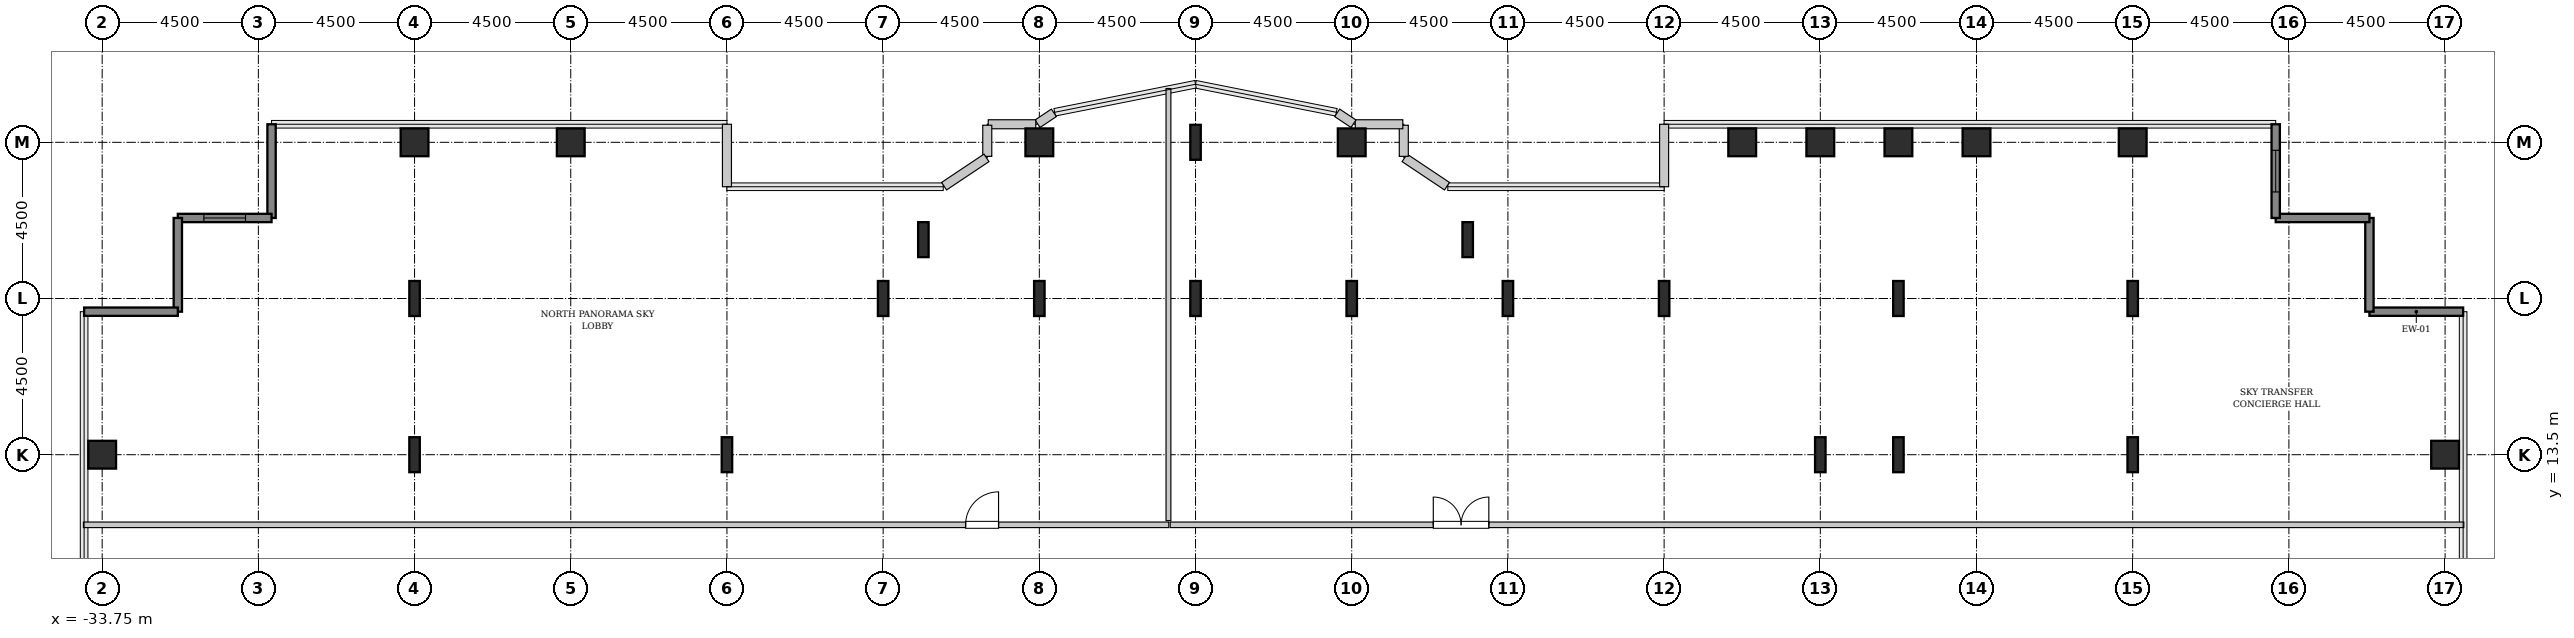
"""IFC4 building model, lengths in metres.
Left out: names, types, materials, properties, quantities, classifications, styles, units other than length and angle.
Written with IfcOpenShell. Run it as: python <this file> out.ifc"""

import sys

from ifc_helpers import new_model, si_unit, direction, frame, frame_2d, origin, origin_2d, place, context, subcontext, project, spatial, rectangle, hollow_rectangle, i_section, extrude, source, transform, mapped, element, fill, save


model = new_model("IFC4")
c1 = context("Model", 3, precision=1e-05, world=origin(), true_north=direction((0.0, 1.0)))
c2 = subcontext(c1, "Body", "Model", "MODEL_VIEW")
j1 = project(units=[si_unit("LENGTHUNIT", "METRE"), si_unit("PLANEANGLEUNIT", "RADIAN")], contexts=[c1])
p1 = place(None, origin())
s1 = spatial("IfcSite", under=j1, at=p1, CompositionType="ELEMENT")
p2 = place(p1, origin())
s2 = spatial("IfcBuilding", under=s1, at=p2, CompositionType="ELEMENT")
p3 = place(p2, frame((0.0, 0.0, 144.0)))
s3 = spatial("IfcBuildingStorey", under=s2, at=p3, CompositionType="ELEMENT", Elevation=144.0)
m1 = source(origin(), c2, "Body", "SweptSolid", [
    extrude(hollow_rectangle(XDim=0.8, YDim=0.8, WallThickness=0.04, InnerFilletRadius=0.04, OuterFilletRadius=0.08, at=origin_2d()), origin(), (0.0, 0.0, 1.0), 4.8),
])
p4 = place(p3, frame((-33.75, 13.5, 0.0), z_axis=(0.0, 0.0, 1.0), x_axis=(1.0, 0.0, 0.0)))
e1 = element("IfcColumn", 1, at=p4, inside=s3, PredefinedType="COLUMN", context=c2, shape_type="MappedRepresentation", body=[
    mapped(m1, transform((0.0, 0.0, 0.0), x_axis=(1.0, 0.0, 0.0), y_axis=(0.0, 1.0, 0.0), z_axis=(0.0, 0.0, 1.0), scale=1.0)),
])
m2 = source(origin(), c2, "Body", "SweptSolid", [
    extrude(i_section(OverallWidth=0.302, OverallDepth=1.008, WebThickness=0.021, FlangeThickness=0.04, FilletRadius=0.03, at=origin_2d()), origin(), (0.0, 0.0, 1.0), 4.8),
])
for number, where, z_axis, x_axis in (
    (2, (-24.75, 13.5, 0.0), (0.0, 0.0, 1.0), (1.0, 0.0, 0.0)),
    (3, (-24.75, 18.0, 0.0), (0.0, 0.0, 1.0), (1.0, 0.0, 0.0)),
):
    element("IfcColumn", number, at=place(p3, frame(where, z_axis=z_axis, x_axis=x_axis)), inside=s3, PredefinedType="COLUMN", context=c2, shape_type="MappedRepresentation", body=[
        mapped(m2, transform((0.0, 0.0, 0.0), x_axis=(1.0, 0.0, 0.0), y_axis=(0.0, 1.0, 0.0), z_axis=(0.0, 0.0, 1.0), scale=1.0)),
    ])
for number, where, z_axis, x_axis in (
    (4, (-24.75, 22.5, 0.0), (0.0, 0.0, 1.0), (1.0, 0.0, 0.0)),
    (5, (-20.25, 22.5, 0.0), (0.0, 0.0, 1.0), (1.0, 0.0, 0.0)),
):
    element("IfcColumn", number, at=place(p3, frame(where, z_axis=z_axis, x_axis=x_axis)), inside=s3, PredefinedType="COLUMN", context=c2, shape_type="MappedRepresentation", body=[
        mapped(m1, transform((0.0, 0.0, 0.0), x_axis=(1.0, 0.0, 0.0), y_axis=(0.0, 1.0, 0.0), z_axis=(0.0, 0.0, 1.0), scale=1.0)),
    ])
for number, where, z_axis, x_axis in (
    (6, (-15.75, 13.5, 0.0), (0.0, 0.0, 1.0), (1.0, 0.0, 0.0)),
    (7, (-11.25, 18.0, 0.0), (0.0, 0.0, 1.0), (1.0, 0.0, 0.0)),
    (8, (-10.091, 19.696, 0.0), (0.0, 0.0, 1.0), (1.0, 0.0, 0.0)),
    (9, (-6.75, 18.0, 0.0), (0.0, 0.0, 1.0), (1.0, 0.0, 0.0)),
):
    element("IfcColumn", number, at=place(p3, frame(where, z_axis=z_axis, x_axis=x_axis)), inside=s3, PredefinedType="COLUMN", context=c2, shape_type="MappedRepresentation", body=[
        mapped(m2, transform((0.0, 0.0, 0.0), x_axis=(1.0, 0.0, 0.0), y_axis=(0.0, 1.0, 0.0), z_axis=(0.0, 0.0, 1.0), scale=1.0)),
    ])
p5 = place(p3, frame((-6.75, 22.5, 0.0), z_axis=(0.0, 0.0, 1.0), x_axis=(1.0, 0.0, 0.0)))
e10 = element("IfcColumn", 10, at=p5, inside=s3, PredefinedType="COLUMN", context=c2, shape_type="MappedRepresentation", body=[
    mapped(m1, transform((0.0, 0.0, 0.0), x_axis=(1.0, 0.0, 0.0), y_axis=(0.0, 1.0, 0.0), z_axis=(0.0, 0.0, 1.0), scale=1.0)),
])
for number, where, z_axis, x_axis in (
    (11, (-2.25, 18.0, 0.0), (0.0, 0.0, 1.0), (1.0, 0.0, 0.0)),
    (12, (-2.25, 22.5, 0.0), (0.0, 0.0, 1.0), (1.0, 0.0, 0.0)),
    (13, (2.25, 18.0, 0.0), (0.0, 0.0, 1.0), (1.0, 0.0, 0.0)),
):
    element("IfcColumn", number, at=place(p3, frame(where, z_axis=z_axis, x_axis=x_axis)), inside=s3, PredefinedType="COLUMN", context=c2, shape_type="MappedRepresentation", body=[
        mapped(m2, transform((0.0, 0.0, 0.0), x_axis=(1.0, 0.0, 0.0), y_axis=(0.0, 1.0, 0.0), z_axis=(0.0, 0.0, 1.0), scale=1.0)),
    ])
p6 = place(p3, frame((2.25, 22.5, 0.0), z_axis=(0.0, 0.0, 1.0), x_axis=(1.0, 0.0, 0.0)))
e14 = element("IfcColumn", 14, at=p6, inside=s3, PredefinedType="COLUMN", context=c2, shape_type="MappedRepresentation", body=[
    mapped(m1, transform((0.0, 0.0, 0.0), x_axis=(1.0, 0.0, 0.0), y_axis=(0.0, 1.0, 0.0), z_axis=(0.0, 0.0, 1.0), scale=1.0)),
])
for number, where, z_axis, x_axis in (
    (15, (5.591, 19.696, 0.0), (0.0, 0.0, 1.0), (1.0, 0.0, 0.0)),
    (16, (6.75, 18.0, 0.0), (0.0, 0.0, 1.0), (1.0, 0.0, 0.0)),
    (17, (11.25, 18.0, 0.0), (0.0, 0.0, 1.0), (1.0, 0.0, 0.0)),
):
    element("IfcColumn", number, at=place(p3, frame(where, z_axis=z_axis, x_axis=x_axis)), inside=s3, PredefinedType="COLUMN", context=c2, shape_type="MappedRepresentation", body=[
        mapped(m2, transform((0.0, 0.0, 0.0), x_axis=(1.0, 0.0, 0.0), y_axis=(0.0, 1.0, 0.0), z_axis=(0.0, 0.0, 1.0), scale=1.0)),
    ])
p7 = place(p3, frame((13.5, 22.5, 0.0), z_axis=(0.0, 0.0, 1.0), x_axis=(1.0, 0.0, 0.0)))
e18 = element("IfcColumn", 18, at=p7, inside=s3, PredefinedType="COLUMN", context=c2, shape_type="MappedRepresentation", body=[
    mapped(m1, transform((0.0, 0.0, 0.0), x_axis=(1.0, 0.0, 0.0), y_axis=(0.0, 1.0, 0.0), z_axis=(0.0, 0.0, 1.0), scale=1.0)),
])
p8 = place(p3, frame((15.75, 13.5, 0.0), z_axis=(0.0, 0.0, 1.0), x_axis=(1.0, 0.0, 0.0)))
e19 = element("IfcColumn", 19, at=p8, inside=s3, PredefinedType="COLUMN", context=c2, shape_type="MappedRepresentation", body=[
    mapped(m2, transform((0.0, 0.0, 0.0), x_axis=(1.0, 0.0, 0.0), y_axis=(0.0, 1.0, 0.0), z_axis=(0.0, 0.0, 1.0), scale=1.0)),
])
p9 = place(p3, frame((15.75, 22.5, 0.0), z_axis=(0.0, 0.0, 1.0), x_axis=(1.0, 0.0, 0.0)))
e20 = element("IfcColumn", 20, at=p9, inside=s3, PredefinedType="COLUMN", context=c2, shape_type="MappedRepresentation", body=[
    mapped(m1, transform((0.0, 0.0, 0.0), x_axis=(1.0, 0.0, 0.0), y_axis=(0.0, 1.0, 0.0), z_axis=(0.0, 0.0, 1.0), scale=1.0)),
])
for number, where, z_axis, x_axis in (
    (21, (18.0, 13.5, 0.0), (0.0, 0.0, 1.0), (1.0, 0.0, 0.0)),
    (22, (18.0, 18.0, 0.0), (0.0, 0.0, 1.0), (1.0, 0.0, 0.0)),
):
    element("IfcColumn", number, at=place(p3, frame(where, z_axis=z_axis, x_axis=x_axis)), inside=s3, PredefinedType="COLUMN", context=c2, shape_type="MappedRepresentation", body=[
        mapped(m2, transform((0.0, 0.0, 0.0), x_axis=(1.0, 0.0, 0.0), y_axis=(0.0, 1.0, 0.0), z_axis=(0.0, 0.0, 1.0), scale=1.0)),
    ])
for number, where, z_axis, x_axis in (
    (23, (18.0, 22.5, 0.0), (0.0, 0.0, 1.0), (1.0, 0.0, 0.0)),
    (24, (20.25, 22.5, 0.0), (0.0, 0.0, 1.0), (1.0, 0.0, 0.0)),
):
    element("IfcColumn", number, at=place(p3, frame(where, z_axis=z_axis, x_axis=x_axis)), inside=s3, PredefinedType="COLUMN", context=c2, shape_type="MappedRepresentation", body=[
        mapped(m1, transform((0.0, 0.0, 0.0), x_axis=(1.0, 0.0, 0.0), y_axis=(0.0, 1.0, 0.0), z_axis=(0.0, 0.0, 1.0), scale=1.0)),
    ])
for number, where, z_axis, x_axis in (
    (25, (24.75, 13.5, 0.0), (0.0, 0.0, 1.0), (1.0, 0.0, 0.0)),
    (26, (24.75, 18.0, 0.0), (0.0, 0.0, 1.0), (1.0, 0.0, 0.0)),
):
    element("IfcColumn", number, at=place(p3, frame(where, z_axis=z_axis, x_axis=x_axis)), inside=s3, PredefinedType="COLUMN", context=c2, shape_type="MappedRepresentation", body=[
        mapped(m2, transform((0.0, 0.0, 0.0), x_axis=(1.0, 0.0, 0.0), y_axis=(0.0, 1.0, 0.0), z_axis=(0.0, 0.0, 1.0), scale=1.0)),
    ])
for number, where, z_axis, x_axis in (
    (27, (24.75, 22.5, 0.0), (0.0, 0.0, 1.0), (1.0, 0.0, 0.0)),
    (28, (33.75, 13.5, 0.0), (0.0, 0.0, 1.0), (1.0, 0.0, 0.0)),
):
    element("IfcColumn", number, at=place(p3, frame(where, z_axis=z_axis, x_axis=x_axis)), inside=s3, PredefinedType="COLUMN", context=c2, shape_type="MappedRepresentation", body=[
        mapped(m1, transform((0.0, 0.0, 0.0), x_axis=(1.0, 0.0, 0.0), y_axis=(0.0, 1.0, 0.0), z_axis=(0.0, 0.0, 1.0), scale=1.0)),
    ])
m3 = source(origin(), c2, "Body", "SweptSolid", [
    extrude(rectangle(XDim=2.7, YDim=0.24, at=frame_2d((1.35, 0.0))), origin(), (0.0, 0.0, 1.0), 4.55),
])
for number, where, z_axis, x_axis in (
    (29, (34.27, 17.62, 0.0), (0.0, 0.0, 1.0), (-1.0, 0.0, 0.0)),
    (30, (31.57, 17.62, 0.0), (0.0, 0.0, 1.0), (0.0, 1.0, 0.0)),
    (31, (31.57, 20.32, 0.0), (0.0, 0.0, 1.0), (-1.0, 0.0, 0.0)),
):
    element("IfcWall", number, at=place(p3, frame(where, z_axis=z_axis, x_axis=x_axis)), inside=s3, PredefinedType="SHEAR", context=c2, shape_type="MappedRepresentation", body=[
        mapped(m3, transform((0.0, 0.0, 0.0), x_axis=(1.0, 0.0, 0.0), y_axis=(0.0, 1.0, 0.0), z_axis=(0.0, 0.0, 1.0), scale=1.0)),
    ])
p10 = place(p3, frame((28.87, 20.32, 0.0), z_axis=(0.0, 0.0, 1.0), x_axis=(0.0, 1.0, 0.0)))
e32 = element("IfcWall", 32, at=p10, inside=s3, PredefinedType="SHEAR", context=c2, shape_type="MappedRepresentation", body=[
    mapped(m3, transform((0.0, 0.0, 0.0), x_axis=(1.0, 0.0, 0.0), y_axis=(0.0, 1.0, 0.0), z_axis=(0.0, 0.0, 1.0), scale=1.0)),
])
p11 = place(p10, frame((0.75, 0.0, 0.85)))
e33 = element("IfcOpeningElement", 33, at=p11, cuts=e32, PredefinedType="OPENING", context=c2, shape_type="SweptSolid", body=[
    extrude(rectangle(XDim=1.2, YDim=1.8, at=frame_2d((0.6, 0.9))), frame((0.0, 0.13, 0.0), z_axis=(0.0, -1.0, 0.0), x_axis=(1.0, 0.0, 0.0)), (0.0, 0.0, 1.0), 0.26),
])
m4 = source(origin(), c2, "Body", "SweptSolid", [
    extrude(rectangle(XDim=1.8, YDim=0.26, at=frame_2d((0.9, 0.0))), origin(), (0.0, 0.0, 1.0), 4.55),
])
p12 = place(p3, frame((11.25, 23.02, 0.0), z_axis=(0.0, 0.0, 1.0), x_axis=(0.0, -1.0, 0.0)))
e34 = element("IfcWall", 34, at=p12, inside=s3, PredefinedType="SOLIDWALL", context=c2, shape_type="MappedRepresentation", body=[
    mapped(m4, transform((0.0, 0.0, 0.0), x_axis=(1.0, 0.0, 0.0), y_axis=(0.0, 1.0, 0.0), z_axis=(0.0, 0.0, 1.0), scale=1.0)),
])
m5 = source(origin(), c2, "Body", "SweptSolid", [
    extrude(rectangle(XDim=1.469, YDim=0.26, at=frame_2d((0.734, 0.0))), origin(), (0.0, 0.0, 1.0), 4.55),
])
p13 = place(p3, frame((4.995, 21.236, 0.0), z_axis=(0.0, 0.0, 1.0), x_axis=(-0.831461760506, 0.555581983884, 0.0)))
e35 = element("IfcWall", 35, at=p13, inside=s3, PredefinedType="SOLIDWALL", context=c2, shape_type="MappedRepresentation", body=[
    mapped(m5, transform((0.0, 0.0, 0.0), x_axis=(1.0, 0.0, 0.0), y_axis=(0.0, 1.0, 0.0), z_axis=(0.0, 0.0, 1.0), scale=1.0)),
])
m6 = source(origin(), c2, "Body", "SweptSolid", [
    extrude(rectangle(XDim=0.897, YDim=0.26, at=frame_2d((0.448, 0.0))), origin(), (0.0, 0.0, 1.0), 4.55),
])
p14 = place(p3, frame((3.75, 22.095, 0.0), z_axis=(0.0, 0.0, 1.0), x_axis=(0.0, 1.0, 0.0)))
e36 = element("IfcWall", 36, at=p14, inside=s3, PredefinedType="SOLIDWALL", context=c2, shape_type="MappedRepresentation", body=[
    mapped(m6, transform((0.0, 0.0, 0.0), x_axis=(1.0, 0.0, 0.0), y_axis=(0.0, 1.0, 0.0), z_axis=(0.0, 0.0, 1.0), scale=1.0)),
])
m7 = source(origin(), c2, "Body", "SweptSolid", [
    extrude(rectangle(XDim=1.37, YDim=0.26, at=frame_2d((0.685, 0.0))), origin(), (0.0, 0.0, 1.0), 4.55),
])
p15 = place(p3, frame((3.722, 23.02, 0.0), z_axis=(0.0, 0.0, 1.0), x_axis=(-1.0, 0.0, 0.0)))
e37 = element("IfcWall", 37, at=p15, inside=s3, PredefinedType="SOLIDWALL", context=c2, shape_type="MappedRepresentation", body=[
    mapped(m7, transform((0.0, 0.0, 0.0), x_axis=(1.0, 0.0, 0.0), y_axis=(0.0, 1.0, 0.0), z_axis=(0.0, 0.0, 1.0), scale=1.0)),
])
m8 = source(origin(), c2, "Body", "SweptSolid", [
    extrude(rectangle(XDim=0.565, YDim=0.26, at=frame_2d((0.283, 0.0))), origin(), (0.0, 0.0, 1.0), 4.55),
])
for number, where, z_axis, x_axis in (
    (38, (2.301, 23.036, 0.0), (0.0, 0.0, 1.0), (-0.832, 0.555, 0.0)),
    (39, (-6.331, 23.35, 0.0), (0.0, 0.0, 1.0), (-0.832, -0.555, 0.0)),
):
    element("IfcWall", number, at=place(p3, frame(where, z_axis=z_axis, x_axis=x_axis)), inside=s3, PredefinedType="SOLIDWALL", context=c2, shape_type="MappedRepresentation", body=[
        mapped(m8, transform((0.0, 0.0, 0.0), x_axis=(1.0, 0.0, 0.0), y_axis=(0.0, 1.0, 0.0), z_axis=(0.0, 0.0, 1.0), scale=1.0)),
    ])
p16 = place(p3, frame((-6.852, 23.02, 0.0), z_axis=(0.0, 0.0, 1.0), x_axis=(-1.0, 0.0, 0.0)))
e40 = element("IfcWall", 40, at=p16, inside=s3, PredefinedType="SOLIDWALL", context=c2, shape_type="MappedRepresentation", body=[
    mapped(m7, transform((0.0, 0.0, 0.0), x_axis=(1.0, 0.0, 0.0), y_axis=(0.0, 1.0, 0.0), z_axis=(0.0, 0.0, 1.0), scale=1.0)),
])
p17 = place(p3, frame((-8.25, 22.992, 0.0), z_axis=(0.0, 0.0, 1.0), x_axis=(0.0, -1.0, 0.0)))
e41 = element("IfcWall", 41, at=p17, inside=s3, PredefinedType="SOLIDWALL", context=c2, shape_type="MappedRepresentation", body=[
    mapped(m6, transform((0.0, 0.0, 0.0), x_axis=(1.0, 0.0, 0.0), y_axis=(0.0, 1.0, 0.0), z_axis=(0.0, 0.0, 1.0), scale=1.0)),
])
p18 = place(p3, frame((-8.273, 22.052, 0.0), z_axis=(0.0, 0.0, 1.0), x_axis=(-0.831461760506, -0.555581983884, 0.0)))
e42 = element("IfcWall", 42, at=p18, inside=s3, PredefinedType="SOLIDWALL", context=c2, shape_type="MappedRepresentation", body=[
    mapped(m5, transform((0.0, 0.0, 0.0), x_axis=(1.0, 0.0, 0.0), y_axis=(0.0, 1.0, 0.0), z_axis=(0.0, 0.0, 1.0), scale=1.0)),
])
p19 = place(p3, frame((-15.75, 21.22, 0.0), z_axis=(0.0, 0.0, 1.0), x_axis=(0.0, 1.0, 0.0)))
e43 = element("IfcWall", 43, at=p19, inside=s3, PredefinedType="SOLIDWALL", context=c2, shape_type="MappedRepresentation", body=[
    mapped(m4, transform((0.0, 0.0, 0.0), x_axis=(1.0, 0.0, 0.0), y_axis=(0.0, 1.0, 0.0), z_axis=(0.0, 0.0, 1.0), scale=1.0)),
])
p20 = place(p3, frame((-28.87, 23.02, 0.0), z_axis=(0.0, 0.0, 1.0), x_axis=(0.0, -1.0, 0.0)))
e44 = element("IfcWall", 44, at=p20, inside=s3, PredefinedType="SHEAR", context=c2, shape_type="MappedRepresentation", body=[
    mapped(m3, transform((0.0, 0.0, 0.0), x_axis=(1.0, 0.0, 0.0), y_axis=(0.0, 1.0, 0.0), z_axis=(0.0, 0.0, 1.0), scale=1.0)),
])
p21 = place(p3, frame((-28.87, 20.32, 0.0), z_axis=(0.0, 0.0, 1.0), x_axis=(-1.0, 0.0, 0.0)))
e45 = element("IfcWall", 45, at=p21, inside=s3, PredefinedType="SHEAR", context=c2, shape_type="MappedRepresentation", body=[
    mapped(m3, transform((0.0, 0.0, 0.0), x_axis=(1.0, 0.0, 0.0), y_axis=(0.0, 1.0, 0.0), z_axis=(0.0, 0.0, 1.0), scale=1.0)),
])
p22 = place(p21, frame((0.75, 0.0, 0.85)))
e46 = element("IfcOpeningElement", 46, at=p22, cuts=e45, PredefinedType="OPENING", context=c2, shape_type="SweptSolid", body=[
    extrude(rectangle(XDim=1.2, YDim=1.8, at=frame_2d((0.6, 0.9))), frame((0.0, 0.13, 0.0), z_axis=(0.0, -1.0, 0.0), x_axis=(1.0, 0.0, 0.0)), (0.0, 0.0, 1.0), 0.26),
])
for number, where, z_axis, x_axis in (
    (47, (-31.57, 20.32, 0.0), (0.0, 0.0, 1.0), (0.0, -1.0, 0.0)),
    (48, (-31.57, 17.62, 0.0), (0.0, 0.0, 1.0), (-1.0, 0.0, 0.0)),
):
    element("IfcWall", number, at=place(p3, frame(where, z_axis=z_axis, x_axis=x_axis)), inside=s3, PredefinedType="SHEAR", context=c2, shape_type="MappedRepresentation", body=[
        mapped(m3, transform((0.0, 0.0, 0.0), x_axis=(1.0, 0.0, 0.0), y_axis=(0.0, 1.0, 0.0), z_axis=(0.0, 0.0, 1.0), scale=1.0)),
    ])
m9 = source(origin(), c2, "Body", "SweptSolid", [
    extrude(rectangle(XDim=31.27, YDim=0.16, at=frame_2d((15.635, 0.0))), origin(), (0.0, 0.0, 1.0), 4.535),
])
p23 = place(p3, frame((-34.29, 11.48, 0.0), z_axis=(0.0, 0.0, 1.0), x_axis=(1.0, 0.0, 0.0)))
e49 = element("IfcWall", 49, at=p23, inside=s3, PredefinedType="PARTITIONING", context=c2, shape_type="MappedRepresentation", body=[
    mapped(m9, transform((0.0, 0.0, 0.0), x_axis=(1.0, 0.0, 0.0), y_axis=(0.0, 1.0, 0.0), z_axis=(0.0, 0.0, 1.0), scale=1.0)),
])
p24 = place(p23, frame((25.415, 0.0, 0.0)))
e50 = element("IfcOpeningElement", 50, at=p24, cuts=e49, PredefinedType="OPENING", context=c2, shape_type="SweptSolid", body=[
    extrude(rectangle(XDim=0.95, YDim=2.1, at=frame_2d((0.475, 1.05))), frame((0.0, 0.09, 0.0), z_axis=(0.0, -1.0, 0.0), x_axis=(1.0, 0.0, 0.0)), (0.0, 0.0, 1.0), 0.18),
])
m10 = source(origin(), c2, "Body", "SweptSolid", [
    extrude(rectangle(XDim=12.449, YDim=0.14, at=frame_2d((6.225, 0.0))), origin(), (0.0, 0.0, 1.0), 4.535),
])
p25 = place(p3, frame((-3.03, 11.6, 0.0), z_axis=(0.0, 0.0, 1.0), x_axis=(0.0, 1.0, 0.0)))
e51 = element("IfcWall", 51, at=p25, inside=s3, PredefinedType="PARTITIONING", context=c2, shape_type="MappedRepresentation", body=[
    mapped(m10, transform((0.0, 0.0, 0.0), x_axis=(1.0, 0.0, 0.0), y_axis=(0.0, 1.0, 0.0), z_axis=(0.0, 0.0, 1.0), scale=1.0)),
])
m11 = source(origin(), c2, "Body", "SweptSolid", [
    extrude(rectangle(XDim=37.27, YDim=0.16, at=frame_2d((18.635, 0.0))), origin(), (0.0, 0.0, 1.0), 4.535),
])
p26 = place(p3, frame((-2.98, 11.48, 0.0), z_axis=(0.0, 0.0, 1.0), x_axis=(1.0, 0.0, 0.0)))
e52 = element("IfcWall", 52, at=p26, inside=s3, PredefinedType="PARTITIONING", context=c2, shape_type="MappedRepresentation", body=[
    mapped(m11, transform((0.0, 0.0, 0.0), x_axis=(1.0, 0.0, 0.0), y_axis=(0.0, 1.0, 0.0), z_axis=(0.0, 0.0, 1.0), scale=1.0)),
])
p27 = place(p26, frame((7.58, 0.0, 0.0)))
e53 = element("IfcOpeningElement", 53, at=p27, cuts=e52, PredefinedType="OPENING", context=c2, shape_type="SweptSolid", body=[
    extrude(rectangle(XDim=1.6, YDim=2.3, at=frame_2d((0.8, 1.15))), frame((0.0, 0.09, 0.0), z_axis=(0.0, -1.0, 0.0), x_axis=(1.0, 0.0, 0.0)), (0.0, 0.0, 1.0), 0.18),
])
m12 = source(origin(), c2, "Body", "SweptSolid", [
    extrude(rectangle(XDim=1.2, YDim=1.8, at=frame_2d((0.6, 0.9))), frame((0.0, 0.03, 0.0), z_axis=(0.0, -1.0, 0.0), x_axis=(1.0, 0.0, 0.0)), (0.0, 0.0, 1.0), 0.06),
])
p28 = place(p11, origin())
e54 = element("IfcWindow", 54, at=p28, inside=s3, PartitioningType="SINGLE_PANEL", PredefinedType="WINDOW", context=c2, shape_type="MappedRepresentation", body=[
    mapped(m12, transform((0.0, 0.0, 0.0), x_axis=(1.0, 0.0, 0.0), y_axis=(0.0, 1.0, 0.0), z_axis=(0.0, 0.0, 1.0), scale=1.0)),
])
fill(e33, e54)
p29 = place(p22, origin())
e55 = element("IfcWindow", 55, at=p29, inside=s3, PartitioningType="SINGLE_PANEL", PredefinedType="WINDOW", context=c2, shape_type="MappedRepresentation", body=[
    mapped(m12, transform((0.0, 0.0, 0.0), x_axis=(1.0, 0.0, 0.0), y_axis=(0.0, 1.0, 0.0), z_axis=(0.0, 0.0, 1.0), scale=1.0)),
])
fill(e46, e55)
m13 = source(origin(), c2, "Body", "SweptSolid", [
    extrude(rectangle(XDim=0.95, YDim=2.1, at=frame_2d((0.475, 1.05))), frame((0.0, 0.025, 0.0), z_axis=(0.0, -1.0, 0.0), x_axis=(1.0, 0.0, 0.0)), (0.0, 0.0, 1.0), 0.05),
])
p30 = place(p24, origin())
e56 = element("IfcDoor", 56, at=p30, inside=s3, OperationType="SINGLE_SWING_RIGHT", PredefinedType="DOOR", context=c2, shape_type="MappedRepresentation", body=[
    mapped(m13, transform((0.0, 0.0, 0.0), x_axis=(1.0, 0.0, 0.0), y_axis=(0.0, 1.0, 0.0), z_axis=(0.0, 0.0, 1.0), scale=1.0)),
])
fill(e50, e56)
m14 = source(origin(), c2, "Body", "SweptSolid", [
    extrude(rectangle(XDim=1.6, YDim=2.3, at=frame_2d((0.8, 1.15))), frame((0.0, 0.025, 0.0), z_axis=(0.0, -1.0, 0.0), x_axis=(1.0, 0.0, 0.0)), (0.0, 0.0, 1.0), 0.05),
])
p31 = place(p27, origin())
e57 = element("IfcDoor", 57, at=p31, inside=s3, OperationType="DOUBLE_DOOR_SINGLE_SWING", PredefinedType="DOOR", context=c2, shape_type="MappedRepresentation", body=[
    mapped(m14, transform((0.0, 0.0, 0.0), x_axis=(1.0, 0.0, 0.0), y_axis=(0.0, 1.0, 0.0), z_axis=(0.0, 0.0, 1.0), scale=1.0)),
])
fill(e53, e57)
save(model, sys.argv[1])
